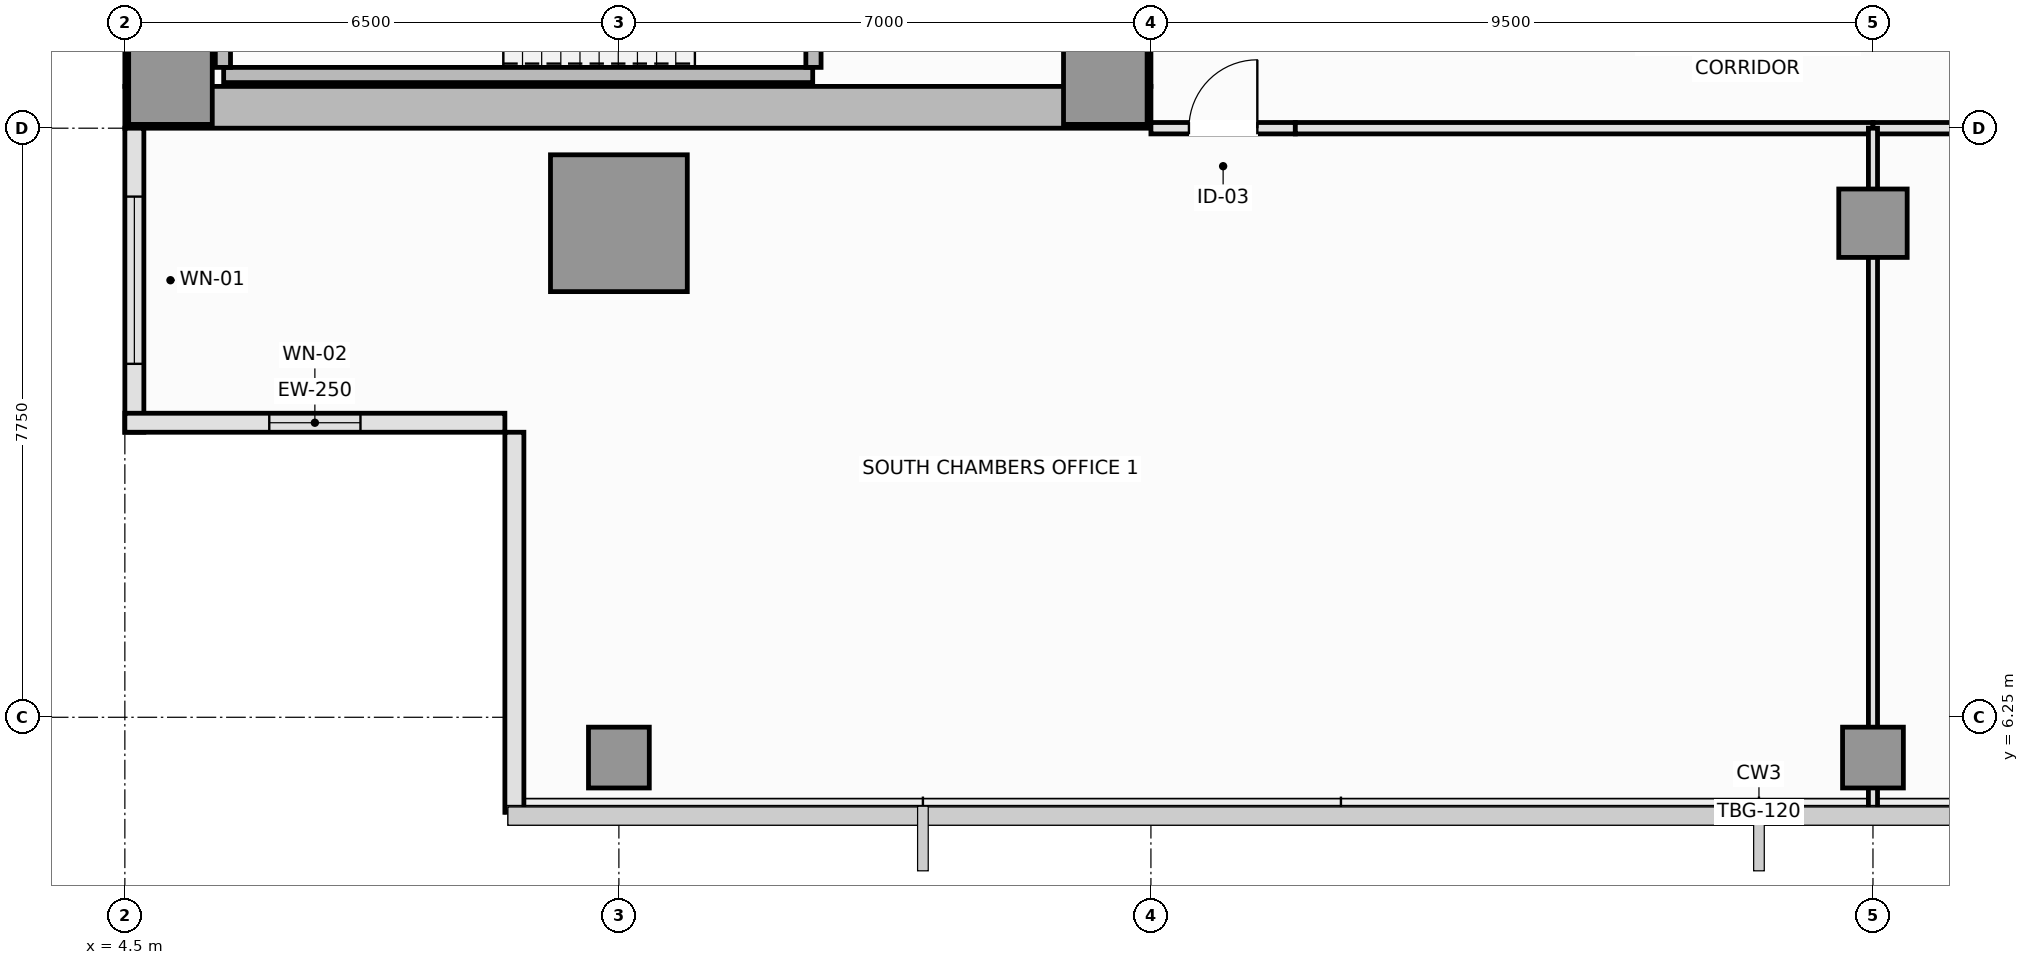
"""IFC4 building model, lengths in metres.
Left out: names, types, materials, properties, quantities, classifications, styles, units other than length and angle.
Written with IfcOpenShell. Run it as: python <this file> out.ifc"""

import sys

from ifc_helpers import new_model, si_unit, direction, frame, frame_2d, origin, origin_2d, place, context, subcontext, project, spatial, rectangle, extrude, element, fill, save


model = new_model("IFC4")
c1 = context("Model", 3, precision=1e-05, world=origin(), true_north=direction((0.0, 1.0)))
c2 = subcontext(c1, "Body", "Model", "MODEL_VIEW")
j1 = project(units=[si_unit("LENGTHUNIT", "METRE"), si_unit("PLANEANGLEUNIT", "RADIAN")], contexts=[c1])
p1 = place(None, origin())
s1 = spatial("IfcSite", under=j1, at=p1, CompositionType="ELEMENT")
p2 = place(p1, origin())
s2 = spatial("IfcBuilding", under=s1, at=p2, CompositionType="ELEMENT")
p3 = place(p2, frame((0.0, 0.0, 212.9)))
s3 = spatial("IfcBuildingStorey", under=s2, at=p3, CompositionType="ELEMENT", Elevation=212.9)
p4 = place(p3, frame((4.5, 14.275, 0.0), z_axis=(0.0, 0.0, 1.0), x_axis=(1.0, 0.0, 0.0)))
e1 = element("IfcWall", 1, at=p4, inside=s3, PredefinedType="SHEAR", context=c2, shape_type="SweptSolid", body=[
    extrude(rectangle(XDim=13.5, YDim=0.55, at=frame_2d((6.75, 0.0))), origin(), (0.0, 0.0, 1.0), 3.55),
])
p5 = place(p3, frame((4.775, 14.55, 0.0), z_axis=(0.0, 0.0, 1.0), x_axis=(0.0, 1.0, 0.0)))
e2 = element("IfcWall", 2, at=p5, inside=s3, PredefinedType="SHEAR", context=c2, shape_type="SweptSolid", body=[
    extrude(rectangle(XDim=21.4, YDim=0.55, at=frame_2d((10.7, 0.0))), origin(), (0.0, 0.0, 1.0), 3.55),
])
p6 = place(p3, frame((17.725, 14.55, 0.0), z_axis=(0.0, 0.0, 1.0), x_axis=(0.0, 1.0, 0.0)))
e3 = element("IfcWall", 3, at=p6, inside=s3, PredefinedType="SHEAR", context=c2, shape_type="SweptSolid", body=[
    extrude(rectangle(XDim=8.9, YDim=0.55, at=frame_2d((4.45, 0.0))), origin(), (0.0, 0.0, 1.0), 3.55),
])
p7 = place(p6, frame((4.35, 0.0, 0.0)))
e4 = element("IfcOpeningElement", 4, at=p7, cuts=e3, PredefinedType="OPENING", context=c2, shape_type="SweptSolid", body=[
    extrude(rectangle(XDim=1.1, YDim=2.15, at=frame_2d((0.55, 1.075))), frame((0.0, 0.285, 0.0), z_axis=(0.0, -1.0, 0.0), x_axis=(1.0, 0.0, 0.0)), (0.0, 0.0, 1.0), 0.57),
])
for number, where, z_axis, x_axis in (
    (5, (5.1, 14.6, 0.0), (0.0, 0.0, 1.0), (1.0, 0.0, 0.0)),
    (6, (17.4, 14.6, 0.0), (0.0, 0.0, 1.0), (1.0, 0.0, 0.0)),
):
    element("IfcColumn", number, at=place(p3, frame(where, z_axis=z_axis, x_axis=x_axis)), inside=s3, PredefinedType="PILASTER", context=c2, shape_type="SweptSolid", body=[
        extrude(rectangle(XDim=1.1, YDim=1.1, at=origin_2d()), origin(), (0.0, 0.0, 1.0), 3.55),
    ])
p8 = place(p3, frame((11.0, 12.75, 0.0), z_axis=(0.0, 0.0, 1.0), x_axis=(1.0, 0.0, 0.0)))
e7 = element("IfcColumn", 7, at=p8, inside=s3, PredefinedType="COLUMN", context=c2, shape_type="SweptSolid", body=[
    extrude(rectangle(XDim=1.8, YDim=1.8, at=origin_2d()), origin(), (0.0, 0.0, 1.0), 3.55),
])
p9 = place(p3, frame((27.5, 12.75, 0.0), z_axis=(0.0, 0.0, 1.0), x_axis=(1.0, 0.0, 0.0)))
e8 = element("IfcColumn", 8, at=p9, inside=s3, PredefinedType="COLUMN", context=c2, shape_type="SweptSolid", body=[
    extrude(rectangle(XDim=0.9, YDim=0.9, at=origin_2d()), origin(), (0.0, 0.0, 1.0), 3.55),
])
for number, where, z_axis, x_axis in (
    (9, (11.0, 5.72, 0.0), (0.0, 0.0, 1.0), (1.0, 0.0, 0.0)),
    (10, (27.5, 5.72, 0.0), (0.0, 0.0, 1.0), (1.0, 0.0, 0.0)),
):
    element("IfcColumn", number, at=place(p3, frame(where, z_axis=z_axis, x_axis=x_axis)), inside=s3, PredefinedType="COLUMN", context=c2, shape_type="SweptSolid", body=[
        extrude(rectangle(XDim=0.8, YDim=0.8, at=origin_2d()), origin(), (0.0, 0.0, 1.0), 3.55),
    ])
p10 = place(p3, frame((4.625, 14.0, 0.0), z_axis=(0.0, 0.0, 1.0), x_axis=(0.0, -1.0, 0.0)))
e11 = element("IfcWall", 11, at=p10, inside=s3, PredefinedType="SOLIDWALL", context=c2, shape_type="SweptSolid", body=[
    extrude(rectangle(XDim=4.0, YDim=0.25, at=frame_2d((2.0, 0.0))), origin(), (0.0, 0.0, 1.0), 3.37),
])
p11 = place(p10, frame((0.9, 0.0, 0.9)))
e12 = element("IfcOpeningElement", 12, at=p11, cuts=e11, PredefinedType="OPENING", context=c2, shape_type="SweptSolid", body=[
    extrude(rectangle(XDim=2.2, YDim=1.8, at=frame_2d((1.1, 0.9))), frame((0.0, 0.135, 0.0), z_axis=(0.0, -1.0, 0.0), x_axis=(1.0, 0.0, 0.0)), (0.0, 0.0, 1.0), 0.27),
])
p12 = place(p3, frame((4.5, 10.125, 0.0), z_axis=(0.0, 0.0, 1.0), x_axis=(1.0, 0.0, 0.0)))
e13 = element("IfcWall", 13, at=p12, inside=s3, PredefinedType="SOLIDWALL", context=c2, shape_type="SweptSolid", body=[
    extrude(rectangle(XDim=5.0, YDim=0.25, at=frame_2d((2.5, 0.0))), origin(), (0.0, 0.0, 1.0), 3.37),
])
p13 = place(p12, frame((1.9, 0.0, 0.9)))
e14 = element("IfcOpeningElement", 14, at=p13, cuts=e13, PredefinedType="OPENING", context=c2, shape_type="SweptSolid", body=[
    extrude(rectangle(XDim=1.2, YDim=1.8, at=frame_2d((0.6, 0.9))), frame((0.0, 0.135, 0.0), z_axis=(0.0, -1.0, 0.0), x_axis=(1.0, 0.0, 0.0)), (0.0, 0.0, 1.0), 0.27),
])
p14 = place(p3, frame((9.625, 10.0, 0.0), z_axis=(0.0, 0.0, 1.0), x_axis=(0.0, -1.0, 0.0)))
e15 = element("IfcWall", 15, at=p14, inside=s3, PredefinedType="SOLIDWALL", context=c2, shape_type="SweptSolid", body=[
    extrude(rectangle(XDim=5.0, YDim=0.25, at=frame_2d((2.5, 0.0))), origin(), (0.0, 0.0, 1.0), 3.37),
])
p15 = place(p3, frame((5.8, 14.7, 0.0), z_axis=(0.0, 0.0, 1.0), x_axis=(1.0, 0.0, 0.0)))
e16 = element("IfcWall", 16, at=p15, inside=s3, PredefinedType="SOLIDWALL", context=c2, shape_type="SweptSolid", body=[
    extrude(rectangle(XDim=7.75, YDim=0.2, at=frame_2d((3.875, 0.0))), origin(), (0.0, 0.0, 1.0), 3.55),
])
p16 = place(p3, frame((5.79, 14.8, 0.0), z_axis=(0.0, 0.0, 1.0), x_axis=(0.0, 1.0, 0.0)))
e17 = element("IfcWall", 17, at=p16, inside=s3, PredefinedType="SOLIDWALL", context=c2, shape_type="SweptSolid", body=[
    extrude(rectangle(XDim=3.05, YDim=0.2, at=frame_2d((1.525, 0.0))), origin(), (0.0, 0.0, 1.0), 3.55),
])
p17 = place(p3, frame((13.56, 14.8, 0.0), z_axis=(0.0, 0.0, 1.0), x_axis=(0.0, 1.0, 0.0)))
e18 = element("IfcWall", 18, at=p17, inside=s3, PredefinedType="SOLIDWALL", context=c2, shape_type="SweptSolid", body=[
    extrude(rectangle(XDim=3.05, YDim=0.2, at=frame_2d((1.525, 0.0))), origin(), (0.0, 0.0, 1.0), 3.55),
])
p18 = place(p17, frame((0.95, 0.0, 0.0)))
e19 = element("IfcOpeningElement", 19, at=p18, cuts=e18, PredefinedType="OPENING", context=c2, shape_type="SweptSolid", body=[
    extrude(rectangle(XDim=1.15, YDim=2.15, at=frame_2d((0.575, 1.075))), frame((0.0, 0.11, 0.0), z_axis=(0.0, -1.0, 0.0), x_axis=(1.0, 0.0, 0.0)), (0.0, 0.0, 1.0), 0.22),
])
p19 = place(p3, frame((18.0, 14.0, 0.0), z_axis=(0.0, 0.0, 1.0), x_axis=(1.0, 0.0, 0.0)))
e20 = element("IfcWall", 20, at=p19, inside=s3, PredefinedType="PARTITIONING", context=c2, shape_type="SweptSolid", body=[
    extrude(rectangle(XDim=1.9, YDim=0.15, at=frame_2d((0.95, 0.0))), origin(), (0.0, 0.0, 1.0), 3.37),
])
p20 = place(p19, frame((0.5, 0.0, 0.0)))
e21 = element("IfcOpeningElement", 21, at=p20, cuts=e20, PredefinedType="OPENING", context=c2, shape_type="SweptSolid", body=[
    extrude(rectangle(XDim=0.9, YDim=2.1, at=frame_2d((0.45, 1.05))), frame((0.0, 0.085, 0.0), z_axis=(0.0, -1.0, 0.0), x_axis=(1.0, 0.0, 0.0)), (0.0, 0.0, 1.0), 0.17),
])
p21 = place(p3, frame((19.9, 14.0, 0.0), z_axis=(0.0, 0.0, 1.0), x_axis=(1.0, 0.0, 0.0)))
e22 = element("IfcWall", 22, at=p21, inside=s3, PredefinedType="PARTITIONING", context=c2, shape_type="SweptSolid", body=[
    extrude(rectangle(XDim=7.6, YDim=0.15, at=frame_2d((3.8, 0.0))), origin(), (0.0, 0.0, 1.0), 3.37),
])
p22 = place(p3, frame((27.5, 14.0, 0.0), z_axis=(0.0, 0.0, 1.0), x_axis=(1.0, 0.0, 0.0)))
e23 = element("IfcWall", 23, at=p22, inside=s3, PredefinedType="PARTITIONING", context=c2, shape_type="SweptSolid", body=[
    extrude(rectangle(XDim=3.5, YDim=0.15, at=frame_2d((1.75, 0.0))), origin(), (0.0, 0.0, 1.0), 3.37),
])
p23 = place(p22, frame((1.25, 0.0, 0.0)))
e24 = element("IfcOpeningElement", 24, at=p23, cuts=e23, PredefinedType="OPENING", context=c2, shape_type="SweptSolid", body=[
    extrude(rectangle(XDim=1.0, YDim=2.15, at=frame_2d((0.5, 1.075))), frame((0.0, 0.085, 0.0), z_axis=(0.0, -1.0, 0.0), x_axis=(1.0, 0.0, 0.0)), (0.0, 0.0, 1.0), 0.17),
])
p24 = place(p3, frame((27.5, 5.01, 0.0), z_axis=(0.0, 0.0, 1.0), x_axis=(0.0, 1.0, 0.0)))
e25 = element("IfcWall", 25, at=p24, inside=s3, PredefinedType="PARTITIONING", context=c2, shape_type="SweptSolid", body=[
    extrude(rectangle(XDim=8.99, YDim=0.12, at=frame_2d((4.495, 0.0))), origin(), (0.0, 0.0, 1.0), 2.92),
])
p25 = place(p11, origin())
e26 = element("IfcWindow", 26, at=p25, inside=s3, PartitioningType="SINGLE_PANEL", PredefinedType="WINDOW", context=c2, shape_type="SweptSolid", body=[
    extrude(rectangle(XDim=2.2, YDim=1.8, at=frame_2d((1.1, 0.9))), frame((0.0, 0.03, 0.0), z_axis=(0.0, -1.0, 0.0), x_axis=(1.0, 0.0, 0.0)), (0.0, 0.0, 1.0), 0.06),
])
fill(e12, e26)
p26 = place(p13, origin())
e27 = element("IfcWindow", 27, at=p26, inside=s3, PartitioningType="SINGLE_PANEL", PredefinedType="WINDOW", context=c2, shape_type="SweptSolid", body=[
    extrude(rectangle(XDim=1.2, YDim=1.8, at=frame_2d((0.6, 0.9))), frame((0.0, 0.03, 0.0), z_axis=(0.0, -1.0, 0.0), x_axis=(1.0, 0.0, 0.0)), (0.0, 0.0, 1.0), 0.06),
])
fill(e14, e27)
p27 = place(p20, origin())
e28 = element("IfcDoor", 28, at=p27, inside=s3, OperationType="SINGLE_SWING_RIGHT", PredefinedType="DOOR", context=c2, shape_type="SweptSolid", body=[
    extrude(rectangle(XDim=0.9, YDim=2.1, at=frame_2d((0.45, 1.05))), frame((0.0, 0.025, 0.0), z_axis=(0.0, -1.0, 0.0), x_axis=(1.0, 0.0, 0.0)), (0.0, 0.0, 1.0), 0.05),
])
fill(e21, e28)
save(model, sys.argv[1])
